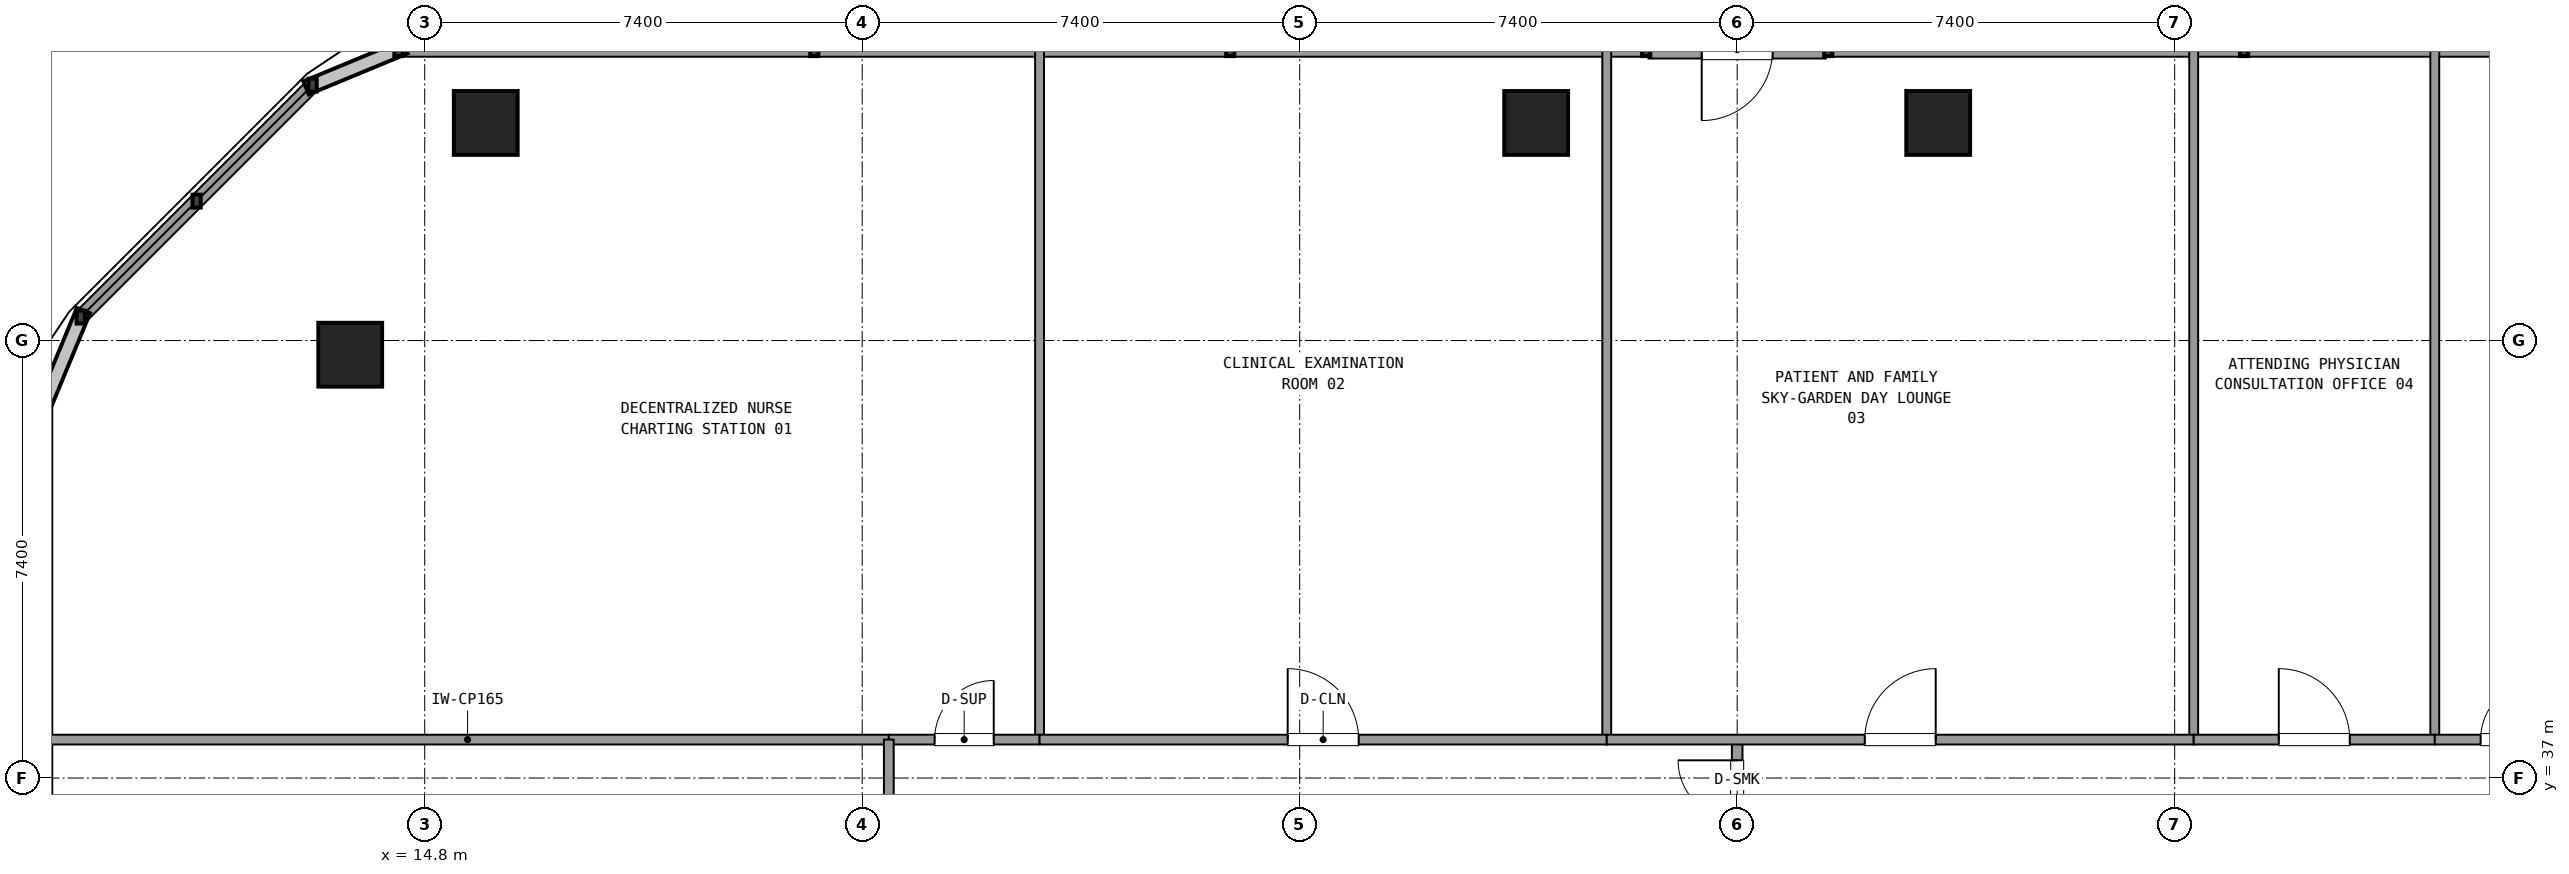
"""IFC4 building model, lengths in metres.
Left out: names, types, materials, properties, quantities, classifications, styles, units other than length and angle.
Written with IfcOpenShell. Run it as: python <this file> out.ifc"""

import sys

from ifc_helpers import new_model, si_unit, direction, frame, frame_2d, origin, origin_2d, place, context, subcontext, project, spatial, rectangle, extrude, element, fill, save


model = new_model("IFC4")
c1 = context("Model", 3, precision=1e-05, world=origin(), true_north=direction((0.0, 1.0)))
c2 = subcontext(c1, "Body", "Model", "MODEL_VIEW")
j1 = project(units=[si_unit("LENGTHUNIT", "METRE"), si_unit("PLANEANGLEUNIT", "RADIAN")], contexts=[c1])
p1 = place(None, origin())
s1 = spatial("IfcSite", under=j1, at=p1, CompositionType="ELEMENT")
p2 = place(p1, origin())
s2 = spatial("IfcBuilding", under=s1, at=p2, CompositionType="ELEMENT")
p3 = place(p2, frame((0.0, 0.0, 31.14)))
s3 = spatial("IfcBuildingStorey", under=s2, at=p3, CompositionType="ELEMENT", Elevation=31.14)
for number, where, z_axis, x_axis in (
    (1, (40.4, 48.08, 0.0), (0.0, 0.0, 1.0), (1.0, 0.0, 0.0)),
    (2, (33.6, 48.08, 0.0), (0.0, 0.0, 1.0), (1.0, 0.0, 0.0)),
    (3, (15.832, 48.08, 0.0), (0.0, 0.0, 1.0), (1.0, 0.0, 0.0)),
    (4, (13.54, 44.16, 0.0), (0.0, 0.0, 1.0), (1.0, 0.0, 0.0)),
):
    element("IfcColumn", number, at=place(p3, frame(where, z_axis=z_axis, x_axis=x_axis)), inside=s3, PredefinedType="COLUMN", context=c2, shape_type="SweptSolid", body=[
        extrude(rectangle(XDim=1.08, YDim=1.08, at=origin_2d()), origin(), (0.0, 0.0, 1.0), 3.6),
    ])
p4 = place(p3, frame((38.5, 49.32, 0.0), z_axis=(0.0, 0.0, 1.0), x_axis=(-1.0, 0.0, 0.0)))
e5 = element("IfcWall", 5, at=p4, inside=s3, PredefinedType="SOLIDWALL", context=c2, shape_type="SweptSolid", body=[
    extrude(rectangle(XDim=3.0, YDim=0.3, at=frame_2d((1.5, 0.0))), origin(), (0.0, 0.0, 1.0), 2.65),
])
p5 = place(p4, frame((0.9, 0.0, 0.0)))
e6 = element("IfcOpeningElement", 6, at=p5, cuts=e5, PredefinedType="OPENING", context=c2, shape_type="SweptSolid", body=[
    extrude(rectangle(XDim=1.2, YDim=2.2, at=frame_2d((0.6, 1.1))), frame((0.0, 0.16, 0.0), z_axis=(0.0, -1.0, 0.0), x_axis=(1.0, 0.0, 0.0)), (0.0, 0.0, 1.0), 0.32),
])
for number, where, z_axis, x_axis in (
    (7, (59.645, 49.32, 0.0), (0.0, 0.0, 1.0), (-1.0, 0.0, 0.0)),
    (8, (35.46, 49.32, 0.0), (0.0, 0.0, 1.0), (-1.0, 0.0, 0.0)),
):
    element("IfcWall", number, at=place(p3, frame(where, z_axis=z_axis, x_axis=x_axis)), inside=s3, PredefinedType="SOLIDWALL", context=c2, shape_type="SweptSolid", body=[
        extrude(rectangle(XDim=21.105, YDim=0.24, at=frame_2d((10.552, 0.0))), origin(), (0.0, 0.0, 1.0), 0.85),
    ])
p6 = place(p3, frame((12.904, 48.719, 0.0), z_axis=(0.0, 0.0, 1.0), x_axis=(-0.707106781187, -0.707106781187, 0.0)))
e9 = element("IfcWall", 9, at=p6, inside=s3, PredefinedType="SOLIDWALL", context=c2, shape_type="SweptSolid", body=[
    extrude(rectangle(XDim=5.548, YDim=0.24, at=frame_2d((2.774, 0.0))), origin(), (0.0, 0.0, 1.0), 0.85),
])
p7 = place(p3, frame((37.0, 34.95, 0.0), z_axis=(0.0, 0.0, 1.0), x_axis=(0.0, 1.0, 0.0)))
e10 = element("IfcWall", 10, at=p7, inside=s3, PredefinedType="PARTITIONING", context=c2, shape_type="SweptSolid", body=[
    extrude(rectangle(XDim=2.7, YDim=0.18, at=frame_2d((1.35, 0.0))), origin(), (0.0, 0.0, 1.0), 2.61),
])
p8 = place(p7, frame((0.35, 0.0, 0.0)))
e11 = element("IfcOpeningElement", 11, at=p8, cuts=e10, PredefinedType="OPENING", context=c2, shape_type="SweptSolid", body=[
    extrude(rectangle(XDim=2.0, YDim=2.2, at=frame_2d((1.0, 1.1))), frame((0.0, 0.1, 0.0), z_axis=(0.0, -1.0, 0.0), x_axis=(1.0, 0.0, 0.0)), (0.0, 0.0, 1.0), 0.2),
])
p9 = place(p3, frame((8.4, 37.65, 0.0), z_axis=(0.0, 0.0, 1.0), x_axis=(1.0, 0.0, 0.0)))
e12 = element("IfcWall", 12, at=p9, inside=s3, PredefinedType="PARTITIONING", context=c2, shape_type="SweptSolid", body=[
    extrude(rectangle(XDim=14.25, YDim=0.165, at=frame_2d((7.125, 0.0))), origin(), (0.0, 0.0, 1.0), 2.61),
])
p10 = place(p3, frame((25.2, 37.65, 0.0), z_axis=(0.0, 0.0, 1.0), x_axis=(0.0, 1.0, 0.0)))
e13 = element("IfcWall", 13, at=p10, inside=s3, PredefinedType="PARTITIONING", context=c2, shape_type="SweptSolid", body=[
    extrude(rectangle(XDim=11.65, YDim=0.15, at=frame_2d((5.825, 0.0))), origin(), (0.0, 0.0, 1.0), 2.61),
])
p11 = place(p3, frame((22.65, 37.65, 0.0), z_axis=(0.0, 0.0, 1.0), x_axis=(1.0, 0.0, 0.0)))
e14 = element("IfcWall", 14, at=p11, inside=s3, PredefinedType="PARTITIONING", context=c2, shape_type="SweptSolid", body=[
    extrude(rectangle(XDim=2.55, YDim=0.165, at=frame_2d((1.275, 0.0))), origin(), (0.0, 0.0, 1.0), 2.61),
])
p12 = place(p11, frame((0.775, 0.0, 0.0)))
e15 = element("IfcOpeningElement", 15, at=p12, cuts=e14, PredefinedType="OPENING", context=c2, shape_type="SweptSolid", body=[
    extrude(rectangle(XDim=1.0, YDim=2.15, at=frame_2d((0.5, 1.075))), frame((0.0, 0.093, 0.0), z_axis=(0.0, -1.0, 0.0), x_axis=(1.0, 0.0, 0.0)), (0.0, 0.0, 1.0), 0.185),
])
p13 = place(p3, frame((34.794, 37.65, 0.0), z_axis=(0.0, 0.0, 1.0), x_axis=(0.0, 1.0, 0.0)))
e16 = element("IfcWall", 16, at=p13, inside=s3, PredefinedType="PARTITIONING", context=c2, shape_type="SweptSolid", body=[
    extrude(rectangle(XDim=11.65, YDim=0.15, at=frame_2d((5.825, 0.0))), origin(), (0.0, 0.0, 1.0), 2.61),
])
p14 = place(p3, frame((25.2, 37.65, 0.0), z_axis=(0.0, 0.0, 1.0), x_axis=(1.0, 0.0, 0.0)))
e17 = element("IfcWall", 17, at=p14, inside=s3, PredefinedType="PARTITIONING", context=c2, shape_type="SweptSolid", body=[
    extrude(rectangle(XDim=9.594, YDim=0.165, at=frame_2d((4.797, 0.0))), origin(), (0.0, 0.0, 1.0), 2.61),
])
p15 = place(p14, frame((4.197, 0.0, 0.0)))
e18 = element("IfcOpeningElement", 18, at=p15, cuts=e17, PredefinedType="OPENING", context=c2, shape_type="SweptSolid", body=[
    extrude(rectangle(XDim=1.2, YDim=2.15, at=frame_2d((0.6, 1.075))), frame((0.0, 0.093, 0.0), z_axis=(0.0, -1.0, 0.0), x_axis=(1.0, 0.0, 0.0)), (0.0, 0.0, 1.0), 0.185),
])
p16 = place(p3, frame((44.722, 37.65, 0.0), z_axis=(0.0, 0.0, 1.0), x_axis=(0.0, 1.0, 0.0)))
e19 = element("IfcWall", 19, at=p16, inside=s3, PredefinedType="PARTITIONING", context=c2, shape_type="SweptSolid", body=[
    extrude(rectangle(XDim=11.65, YDim=0.15, at=frame_2d((5.825, 0.0))), origin(), (0.0, 0.0, 1.0), 2.61),
])
p17 = place(p3, frame((34.794, 37.65, 0.0), z_axis=(0.0, 0.0, 1.0), x_axis=(1.0, 0.0, 0.0)))
e20 = element("IfcWall", 20, at=p17, inside=s3, PredefinedType="PARTITIONING", context=c2, shape_type="SweptSolid", body=[
    extrude(rectangle(XDim=9.928, YDim=0.165, at=frame_2d((4.964, 0.0))), origin(), (0.0, 0.0, 1.0), 2.61),
])
p18 = place(p17, frame((4.364, 0.0, 0.0)))
e21 = element("IfcOpeningElement", 21, at=p18, cuts=e20, PredefinedType="OPENING", context=c2, shape_type="SweptSolid", body=[
    extrude(rectangle(XDim=1.2, YDim=2.15, at=frame_2d((0.6, 1.075))), frame((0.0, 0.093, 0.0), z_axis=(0.0, -1.0, 0.0), x_axis=(1.0, 0.0, 0.0)), (0.0, 0.0, 1.0), 0.185),
])
p19 = place(p3, frame((48.8, 37.65, 0.0), z_axis=(0.0, 0.0, 1.0), x_axis=(0.0, 1.0, 0.0)))
e22 = element("IfcWall", 22, at=p19, inside=s3, PredefinedType="PARTITIONING", context=c2, shape_type="SweptSolid", body=[
    extrude(rectangle(XDim=11.65, YDim=0.15, at=frame_2d((5.825, 0.0))), origin(), (0.0, 0.0, 1.0), 2.61),
])
p20 = place(p3, frame((44.722, 37.65, 0.0), z_axis=(0.0, 0.0, 1.0), x_axis=(1.0, 0.0, 0.0)))
e23 = element("IfcWall", 23, at=p20, inside=s3, PredefinedType="PARTITIONING", context=c2, shape_type="SweptSolid", body=[
    extrude(rectangle(XDim=4.078, YDim=0.165, at=frame_2d((2.039, 0.0))), origin(), (0.0, 0.0, 1.0), 2.61),
])
p21 = place(p20, frame((1.439, 0.0, 0.0)))
e24 = element("IfcOpeningElement", 24, at=p21, cuts=e23, PredefinedType="OPENING", context=c2, shape_type="SweptSolid", body=[
    extrude(rectangle(XDim=1.2, YDim=2.15, at=frame_2d((0.6, 1.075))), frame((0.0, 0.093, 0.0), z_axis=(0.0, -1.0, 0.0), x_axis=(1.0, 0.0, 0.0)), (0.0, 0.0, 1.0), 0.185),
])
p22 = place(p3, frame((48.8, 37.65, 0.0), z_axis=(0.0, 0.0, 1.0), x_axis=(1.0, 0.0, 0.0)))
e25 = element("IfcWall", 25, at=p22, inside=s3, PredefinedType="PARTITIONING", context=c2, shape_type="SweptSolid", body=[
    extrude(rectangle(XDim=2.55, YDim=0.165, at=frame_2d((1.275, 0.0))), origin(), (0.0, 0.0, 1.0), 2.61),
])
p23 = place(p22, frame((0.775, 0.0, 0.0)))
e26 = element("IfcOpeningElement", 26, at=p23, cuts=e25, PredefinedType="OPENING", context=c2, shape_type="SweptSolid", body=[
    extrude(rectangle(XDim=1.0, YDim=2.15, at=frame_2d((0.5, 1.075))), frame((0.0, 0.093, 0.0), z_axis=(0.0, -1.0, 0.0), x_axis=(1.0, 0.0, 0.0)), (0.0, 0.0, 1.0), 0.185),
])
p24 = place(p3, frame((22.65, 30.13, 0.0), z_axis=(0.0, 0.0, 1.0), x_axis=(0.0, 1.0, 0.0)))
e27 = element("IfcWall", 27, at=p24, inside=s3, PredefinedType="PARTITIONING", context=c2, shape_type="SweptSolid", body=[
    extrude(rectangle(XDim=7.52, YDim=0.165, at=frame_2d((3.76, 0.0))), origin(), (0.0, 0.0, 1.0), 2.61),
])
p25 = place(p24, frame((3.16, 0.0, 0.0)))
e28 = element("IfcOpeningElement", 28, at=p25, cuts=e27, PredefinedType="OPENING", context=c2, shape_type="SweptSolid", body=[
    extrude(rectangle(XDim=1.2, YDim=2.15, at=frame_2d((0.6, 1.075))), frame((0.0, 0.093, 0.0), z_axis=(0.0, -1.0, 0.0), x_axis=(1.0, 0.0, 0.0)), (0.0, 0.0, 1.0), 0.185),
])
p26 = place(p8, origin())
e29 = element("IfcDoor", 29, at=p26, inside=s3, OperationType="DOUBLE_DOOR_SINGLE_SWING", PredefinedType="DOOR", context=c2, shape_type="SweptSolid", body=[
    extrude(rectangle(XDim=2.0, YDim=2.2, at=frame_2d((1.0, 1.1))), frame((0.0, 0.025, 0.0), z_axis=(0.0, -1.0, 0.0), x_axis=(1.0, 0.0, 0.0)), (0.0, 0.0, 1.0), 0.05),
])
fill(e11, e29)
p27 = place(p12, origin())
e30 = element("IfcDoor", 30, at=p27, inside=s3, OperationType="SINGLE_SWING_RIGHT", PredefinedType="DOOR", context=c2, shape_type="SweptSolid", body=[
    extrude(rectangle(XDim=1.0, YDim=2.15, at=frame_2d((0.5, 1.075))), frame((0.0, 0.025, 0.0), z_axis=(0.0, -1.0, 0.0), x_axis=(1.0, 0.0, 0.0)), (0.0, 0.0, 1.0), 0.05),
])
fill(e15, e30)
p28 = place(p15, origin())
e31 = element("IfcDoor", 31, at=p28, inside=s3, OperationType="SINGLE_SWING_LEFT", PredefinedType="DOOR", context=c2, shape_type="SweptSolid", body=[
    extrude(rectangle(XDim=1.2, YDim=2.15, at=frame_2d((0.6, 1.075))), frame((0.0, 0.025, 0.0), z_axis=(0.0, -1.0, 0.0), x_axis=(1.0, 0.0, 0.0)), (0.0, 0.0, 1.0), 0.05),
])
fill(e18, e31)
p29 = place(p18, origin())
e32 = element("IfcDoor", 32, at=p29, inside=s3, OperationType="SINGLE_SWING_RIGHT", PredefinedType="DOOR", context=c2, shape_type="SweptSolid", body=[
    extrude(rectangle(XDim=1.2, YDim=2.15, at=frame_2d((0.6, 1.075))), frame((0.0, 0.025, 0.0), z_axis=(0.0, -1.0, 0.0), x_axis=(1.0, 0.0, 0.0)), (0.0, 0.0, 1.0), 0.05),
])
fill(e21, e32)
p30 = place(p21, origin())
e33 = element("IfcDoor", 33, at=p30, inside=s3, OperationType="SINGLE_SWING_LEFT", PredefinedType="DOOR", context=c2, shape_type="SweptSolid", body=[
    extrude(rectangle(XDim=1.2, YDim=2.15, at=frame_2d((0.6, 1.075))), frame((0.0, 0.025, 0.0), z_axis=(0.0, -1.0, 0.0), x_axis=(1.0, 0.0, 0.0)), (0.0, 0.0, 1.0), 0.05),
])
fill(e24, e33)
p31 = place(p23, origin())
e34 = element("IfcDoor", 34, at=p31, inside=s3, OperationType="SINGLE_SWING_RIGHT", PredefinedType="DOOR", context=c2, shape_type="SweptSolid", body=[
    extrude(rectangle(XDim=1.0, YDim=2.15, at=frame_2d((0.5, 1.075))), frame((0.0, 0.025, 0.0), z_axis=(0.0, -1.0, 0.0), x_axis=(1.0, 0.0, 0.0)), (0.0, 0.0, 1.0), 0.05),
])
fill(e26, e34)
save(model, sys.argv[1])
